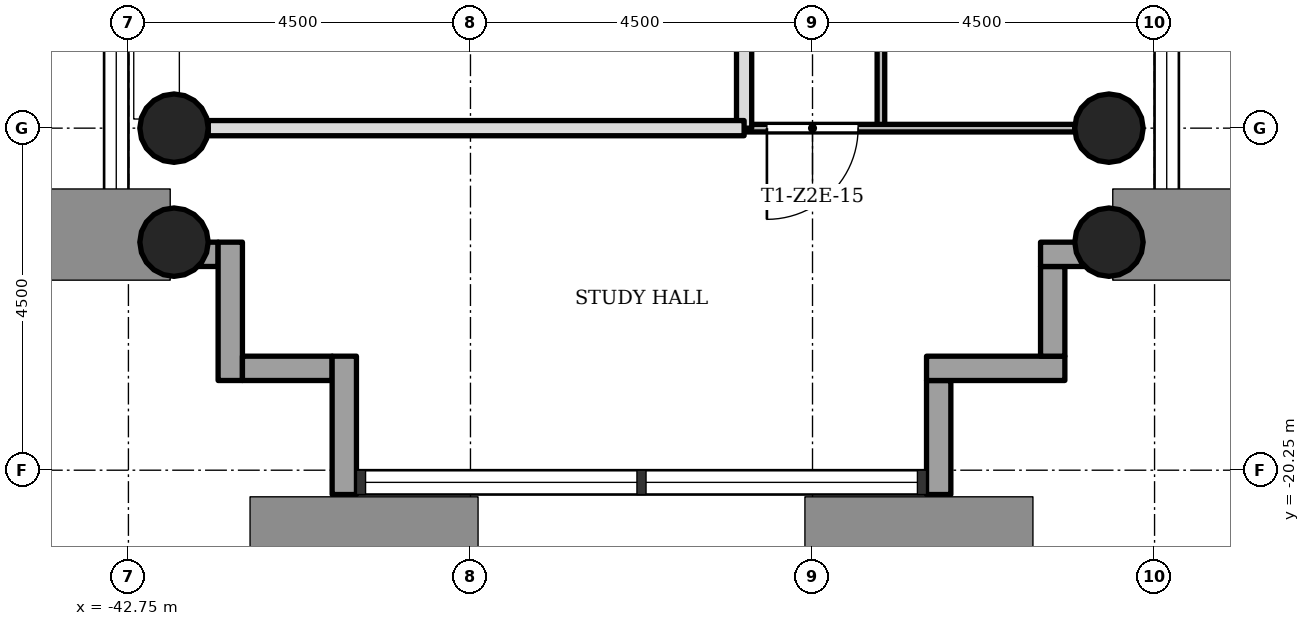
"""IFC4 building model, lengths in metres.
Left out: names, types, materials, properties, quantities, classifications, styles, units other than length and angle.
Written with IfcOpenShell. Run it as: python <this file> out.ifc"""

import sys

from ifc_helpers import new_model, si_unit, direction, frame, frame_2d, origin, origin_2d, place, context, subcontext, project, spatial, rectangle, hollow_circle, extrude, element, fill, save


model = new_model("IFC4")
c1 = context("Model", 3, precision=1e-05, world=origin(), true_north=direction((0.0, 1.0)))
c2 = subcontext(c1, "Body", "Model", "MODEL_VIEW")
j1 = project(units=[si_unit("LENGTHUNIT", "METRE"), si_unit("PLANEANGLEUNIT", "RADIAN")], contexts=[c1])
p1 = place(None, origin())
s1 = spatial("IfcSite", under=j1, at=p1, CompositionType="ELEMENT")
p2 = place(p1, origin())
s2 = spatial("IfcBuilding", under=s1, at=p2, CompositionType="ELEMENT")
p3 = place(p2, frame((0.0, 0.0, 100.4)))
s3 = spatial("IfcBuildingStorey", under=s2, at=p3, CompositionType="ELEMENT", Elevation=100.4)
for number, where, z_axis, x_axis in (
    (1, (-42.15, -15.75, 0.0), (0.0, 0.0, 1.0), (1.0, 0.0, 0.0)),
    (2, (-29.85, -15.75, 0.0), (0.0, 0.0, 1.0), (1.0, 0.0, 0.0)),
    (3, (-42.15, -17.25, 0.0), (0.0, 0.0, 1.0), (1.0, 0.0, 0.0)),
    (4, (-29.85, -17.25, 0.0), (0.0, 0.0, 1.0), (1.0, 0.0, 0.0)),
):
    element("IfcColumn", number, at=place(p3, frame(where, z_axis=z_axis, x_axis=x_axis)), inside=s3, PredefinedType="COLUMN", context=c2, shape_type="SweptSolid", body=[
        extrude(hollow_circle(Radius=0.45, WallThickness=0.032, at=origin_2d()), origin(), (0.0, 0.0, 1.0), 3.4),
    ])
p4 = place(p3, frame((-43.07, -17.41, -0.3), z_axis=(0.0, 0.0, 1.0), x_axis=(1.0, 0.0, 0.0)))
e5 = element("IfcWall", 5, at=p4, inside=s3, PredefinedType="STANDARD", context=c2, shape_type="SweptSolid", body=[
    extrude(rectangle(XDim=1.5, YDim=0.32, at=frame_2d((0.75, 0.0))), origin(), (0.0, 0.0, 1.0), 3.4),
])
p5 = place(p3, frame((-41.41, -17.25, -0.3), z_axis=(0.0, 0.0, 1.0), x_axis=(0.0, -1.0, 0.0)))
e6 = element("IfcWall", 6, at=p5, inside=s3, PredefinedType="STANDARD", context=c2, shape_type="SweptSolid", body=[
    extrude(rectangle(XDim=1.82, YDim=0.32, at=frame_2d((0.91, 0.0))), origin(), (0.0, 0.0, 1.0), 3.4),
])
p6 = place(p3, frame((-41.25, -18.91, -0.3), z_axis=(0.0, 0.0, 1.0), x_axis=(1.0, 0.0, 0.0)))
e7 = element("IfcWall", 7, at=p6, inside=s3, PredefinedType="STANDARD", context=c2, shape_type="SweptSolid", body=[
    extrude(rectangle(XDim=1.18, YDim=0.32, at=frame_2d((0.59, 0.0))), origin(), (0.0, 0.0, 1.0), 3.4),
])
p7 = place(p3, frame((-39.91, -18.75, -0.3), z_axis=(0.0, 0.0, 1.0), x_axis=(0.0, -1.0, 0.0)))
e8 = element("IfcWall", 8, at=p7, inside=s3, PredefinedType="STANDARD", context=c2, shape_type="SweptSolid", body=[
    extrude(rectangle(XDim=1.82, YDim=0.32, at=frame_2d((0.91, 0.0))), origin(), (0.0, 0.0, 1.0), 3.4),
])
p8 = place(p3, frame((-32.09, -20.57, -0.3), z_axis=(0.0, 0.0, 1.0), x_axis=(0.0, 1.0, 0.0)))
e9 = element("IfcWall", 9, at=p8, inside=s3, PredefinedType="STANDARD", context=c2, shape_type="SweptSolid", body=[
    extrude(rectangle(XDim=1.5, YDim=0.32, at=frame_2d((0.75, 0.0))), origin(), (0.0, 0.0, 1.0), 3.4),
])
p9 = place(p3, frame((-32.25, -18.91, -0.3), z_axis=(0.0, 0.0, 1.0), x_axis=(1.0, 0.0, 0.0)))
e10 = element("IfcWall", 10, at=p9, inside=s3, PredefinedType="STANDARD", context=c2, shape_type="SweptSolid", body=[
    extrude(rectangle(XDim=1.82, YDim=0.32, at=frame_2d((0.91, 0.0))), origin(), (0.0, 0.0, 1.0), 3.4),
])
p10 = place(p3, frame((-30.59, -18.75, -0.3), z_axis=(0.0, 0.0, 1.0), x_axis=(0.0, 1.0, 0.0)))
e11 = element("IfcWall", 11, at=p10, inside=s3, PredefinedType="STANDARD", context=c2, shape_type="SweptSolid", body=[
    extrude(rectangle(XDim=1.18, YDim=0.32, at=frame_2d((0.59, 0.0))), origin(), (0.0, 0.0, 1.0), 3.4),
])
p11 = place(p3, frame((-30.75, -17.41, -0.3), z_axis=(0.0, 0.0, 1.0), x_axis=(1.0, 0.0, 0.0)))
e12 = element("IfcWall", 12, at=p11, inside=s3, PredefinedType="STANDARD", context=c2, shape_type="SweptSolid", body=[
    extrude(rectangle(XDim=1.82, YDim=0.32, at=frame_2d((0.91, 0.0))), origin(), (0.0, 0.0, 1.0), 3.4),
])
p12 = place(p3, frame((-34.65, -15.75, 0.0), z_axis=(0.0, 0.0, 1.0), x_axis=(0.0, 1.0, 0.0)))
e13 = element("IfcWall", 13, at=p12, inside=s3, PredefinedType="SOLIDWALL", context=c2, shape_type="SweptSolid", body=[
    extrude(rectangle(XDim=7.2, YDim=0.2, at=frame_2d((3.6, 0.0))), origin(), (0.0, 0.0, 1.0), 3.0),
])
p13 = place(p12, frame((1.95, 0.0, 0.0)))
e14 = element("IfcOpeningElement", 14, at=p13, cuts=e13, PredefinedType="OPENING", context=c2, shape_type="SweptSolid", body=[
    extrude(rectangle(XDim=0.9, YDim=2.1, at=frame_2d((0.45, 1.05))), frame((0.0, 0.11, 0.0), z_axis=(0.0, -1.0, 0.0), x_axis=(1.0, 0.0, 0.0)), (0.0, 0.0, 1.0), 0.22),
])
p14 = place(p3, frame((-32.85, -15.75, 0.0), z_axis=(0.0, 0.0, 1.0), x_axis=(0.0, 1.0, 0.0)))
e15 = element("IfcWall", 15, at=p14, inside=s3, PredefinedType="PARTITIONING", context=c2, shape_type="SweptSolid", body=[
    extrude(rectangle(XDim=9.0, YDim=0.1, at=frame_2d((4.5, 0.0))), origin(), (0.0, 0.0, 1.0), 3.0),
])
p15 = place(p14, frame((5.55, 0.0, 0.0)))
e16 = element("IfcOpeningElement", 16, at=p15, cuts=e15, PredefinedType="OPENING", context=c2, shape_type="SweptSolid", body=[
    extrude(rectangle(XDim=0.9, YDim=2.1, at=frame_2d((0.45, 1.05))), frame((0.0, 0.06, 0.0), z_axis=(0.0, -1.0, 0.0), x_axis=(1.0, 0.0, 0.0)), (0.0, 0.0, 1.0), 0.12),
])
p16 = place(p3, frame((-34.65, -15.75, 0.0), z_axis=(0.0, 0.0, 1.0), x_axis=(1.0, 0.0, 0.0)))
e17 = element("IfcWall", 17, at=p16, inside=s3, PredefinedType="PARTITIONING", context=c2, shape_type="SweptSolid", body=[
    extrude(rectangle(XDim=4.35, YDim=0.1, at=frame_2d((2.175, 0.0))), origin(), (0.0, 0.0, 1.0), 3.0),
])
p17 = place(p16, frame((0.3, 0.0, 0.0)))
e18 = element("IfcOpeningElement", 18, at=p17, cuts=e17, PredefinedType="OPENING", context=c2, shape_type="SweptSolid", body=[
    extrude(rectangle(XDim=1.2, YDim=2.1, at=frame_2d((0.6, 1.05))), frame((0.0, 0.06, 0.0), z_axis=(0.0, -1.0, 0.0), x_axis=(1.0, 0.0, 0.0)), (0.0, 0.0, 1.0), 0.12),
])
p18 = place(p3, frame((-41.7, -15.75, 0.0), z_axis=(0.0, 0.0, 1.0), x_axis=(1.0, 0.0, 0.0)))
e19 = element("IfcWall", 19, at=p18, inside=s3, PredefinedType="SOLIDWALL", context=c2, shape_type="SweptSolid", body=[
    extrude(rectangle(XDim=7.05, YDim=0.2, at=frame_2d((3.525, 0.0))), origin(), (0.0, 0.0, 1.0), 3.0),
])
p19 = place(p17, origin())
e20 = element("IfcDoor", 20, at=p19, inside=s3, OperationType="SINGLE_SWING_LEFT", PredefinedType="DOOR", context=c2, shape_type="SweptSolid", body=[
    extrude(rectangle(XDim=1.2, YDim=2.1, at=frame_2d((0.6, 1.05))), frame((0.0, 0.025, 0.0), z_axis=(0.0, -1.0, 0.0), x_axis=(1.0, 0.0, 0.0)), (0.0, 0.0, 1.0), 0.05),
])
fill(e18, e20)
save(model, sys.argv[1])
